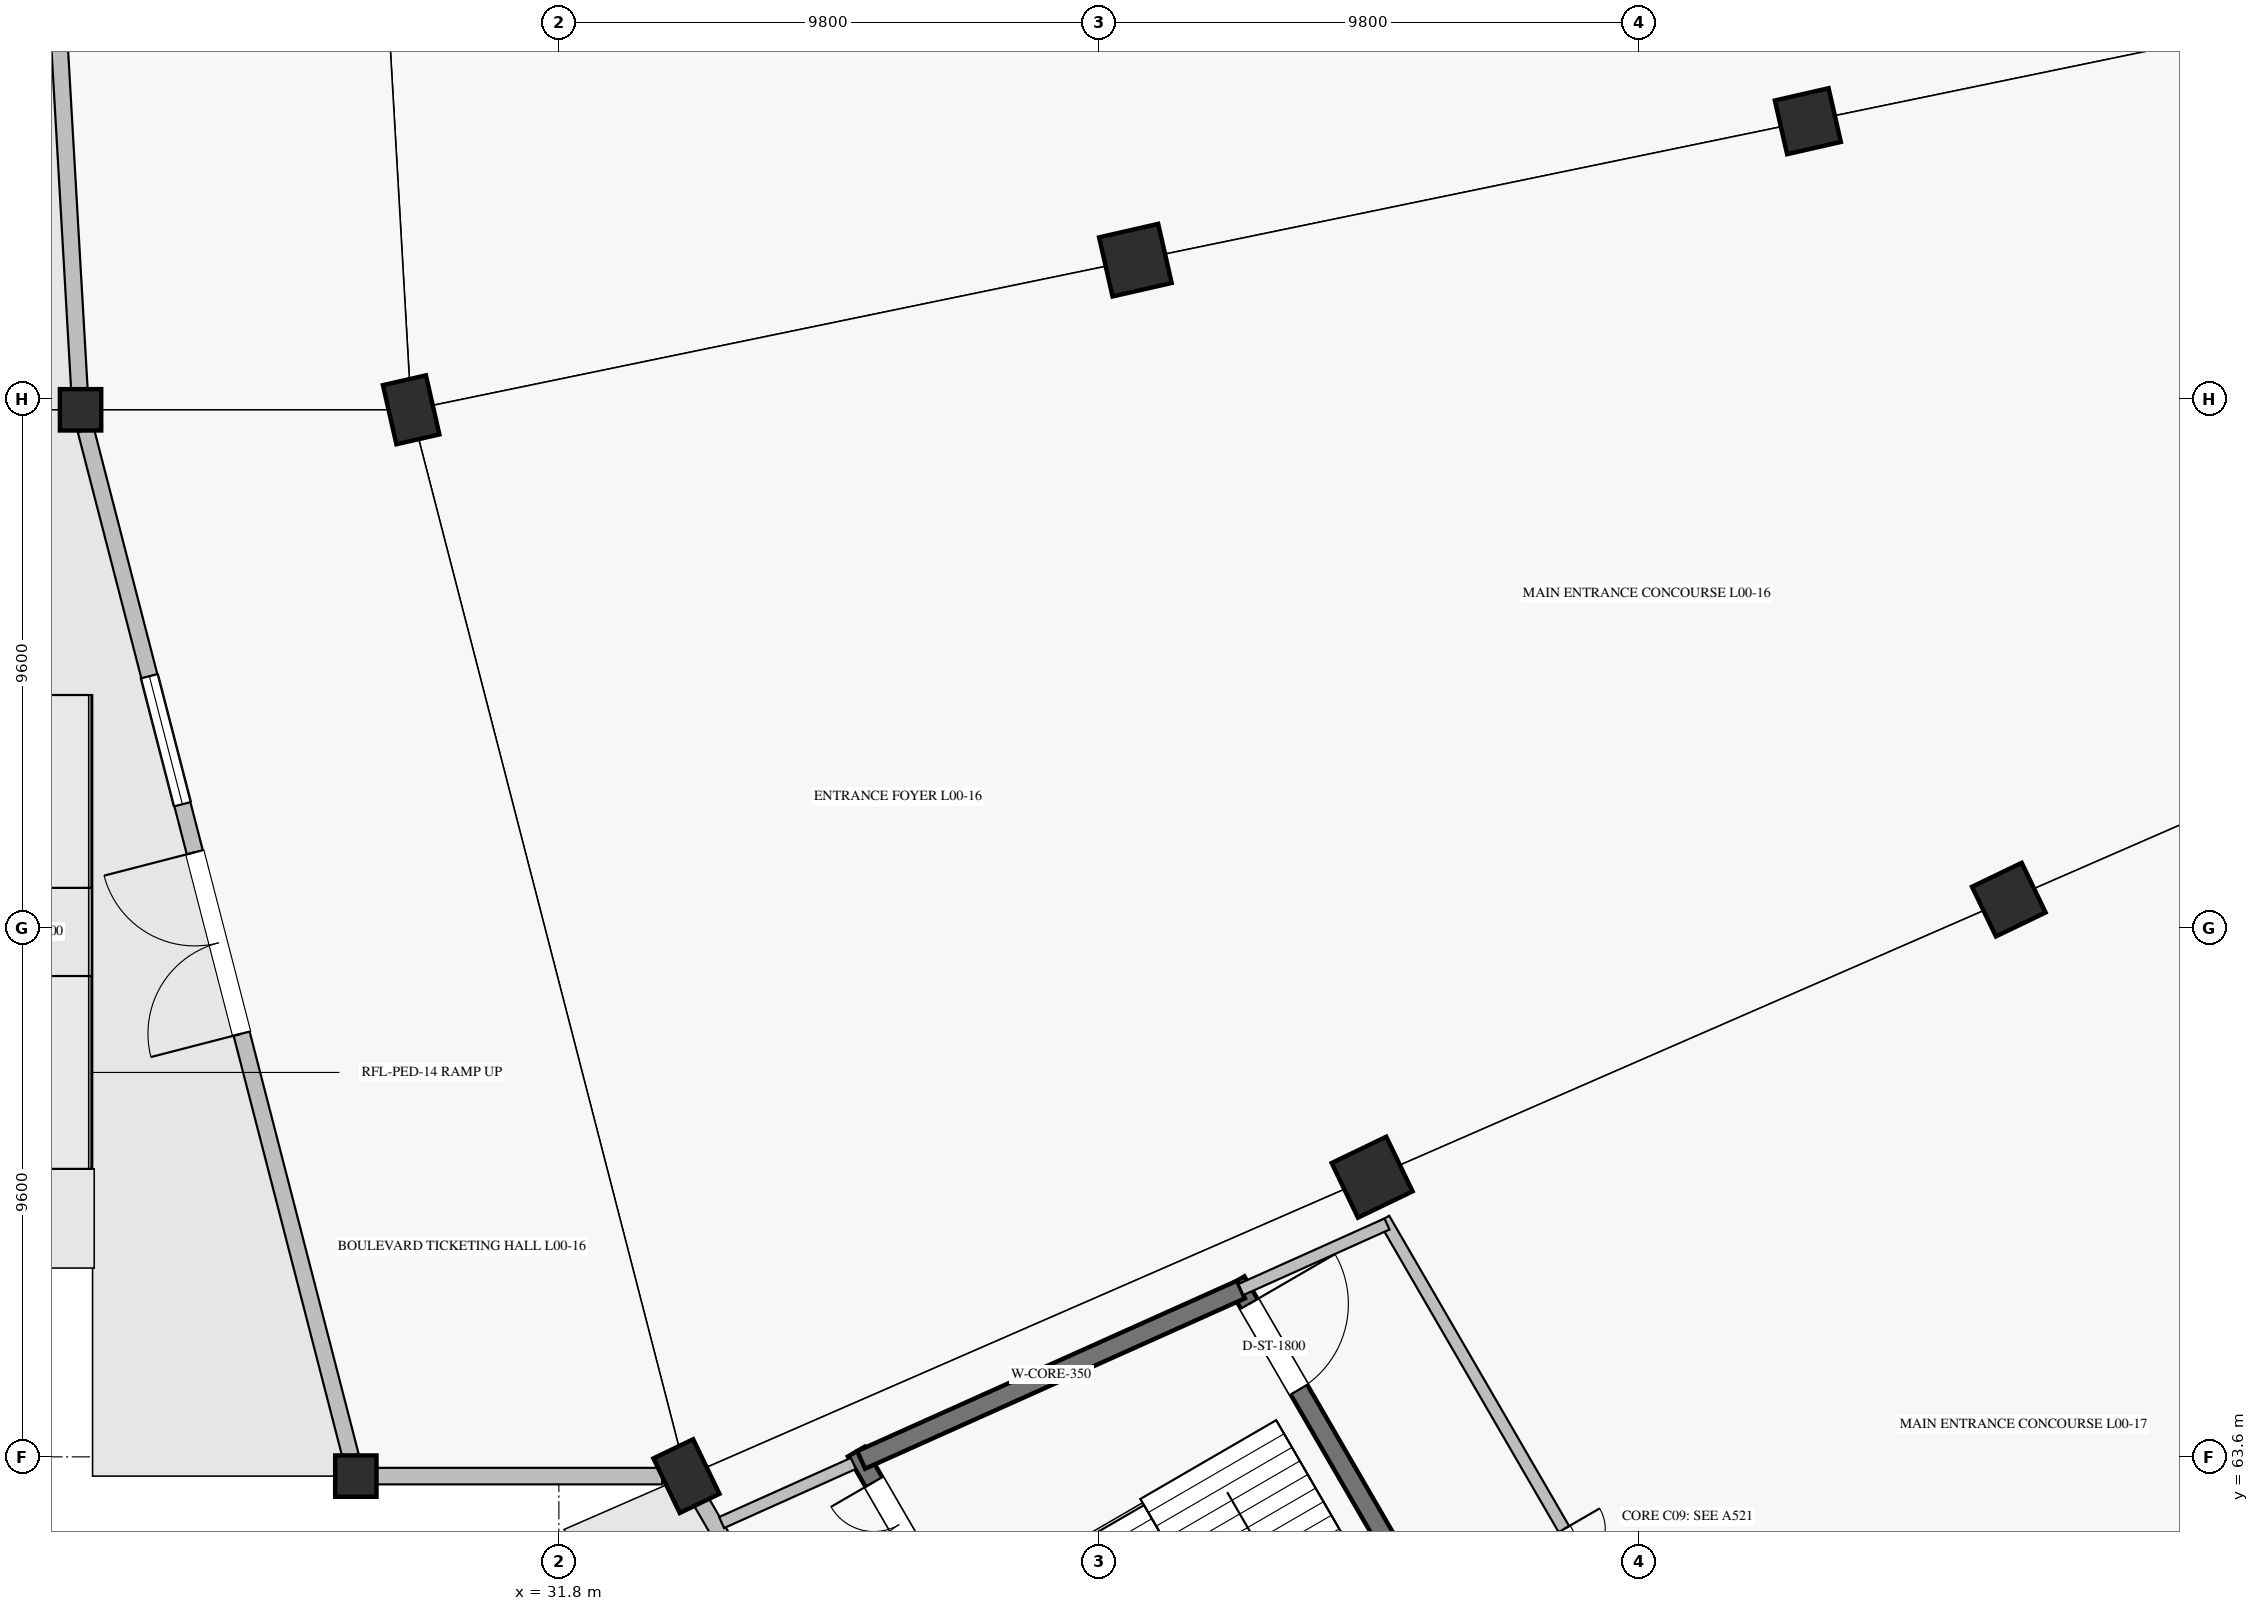
"""IFC4 building model, lengths in metres.
Left out: names, types, materials, properties, quantities, classifications, styles, units other than length and angle.
Written with IfcOpenShell. Run it as: python <this file> out.ifc"""

import sys

from ifc_helpers import new_model, si_unit, direction, frame, frame_2d, origin, origin_2d, place, context, subcontext, project, spatial, rectangle, extrude, element, fill, save


model = new_model("IFC4")
c1 = context("Model", 3, precision=1e-05, world=origin(), true_north=direction((0.0, 1.0)))
c2 = subcontext(c1, "Body", "Model", "MODEL_VIEW")
j1 = project(units=[si_unit("LENGTHUNIT", "METRE"), si_unit("PLANEANGLEUNIT", "RADIAN")], contexts=[c1])
p1 = place(None, origin())
s1 = spatial("IfcSite", under=j1, at=p1, CompositionType="ELEMENT")
p2 = place(p1, origin())
s2 = spatial("IfcBuilding", under=s1, at=p2, CompositionType="ELEMENT")
p3 = place(p2, origin())
s3 = spatial("IfcBuildingStorey", under=s2, at=p3, CompositionType="ELEMENT", Elevation=0.0)
for number, where, z_axis, x_axis in (
    (1, (54.467, 87.84, 0.0), (0.0, 0.0, 1.0), (-0.975, -0.223, 0.0)),
    (2, (58.114, 73.713, 0.0), (0.0, 0.0, 1.0), (-0.901, -0.434, 0.0)),
):
    element("IfcColumn", number, at=place(p3, frame(where, z_axis=z_axis, x_axis=x_axis)), inside=s3, PredefinedType="COLUMN", context=c2, shape_type="SweptSolid", body=[
        extrude(rectangle(XDim=1.0, YDim=1.0, at=origin_2d()), origin(), (0.0, 0.0, 1.0), 5.78),
    ])
for number, where, z_axis, x_axis in (
    (3, (42.262, 85.318, 0.0), (0.0, 0.0, 1.0), (-0.975, -0.223, 0.0)),
    (4, (46.559, 68.675, 0.0), (0.0, 0.0, 1.0), (-0.901, -0.434, 0.0)),
):
    element("IfcColumn", number, at=place(p3, frame(where, z_axis=z_axis, x_axis=x_axis)), inside=s3, PredefinedType="COLUMN", context=c2, shape_type="SweptSolid", body=[
        extrude(rectangle(XDim=1.1, YDim=1.1, at=origin_2d()), origin(), (0.0, 0.0, 1.0), 5.78),
    ])
for number, where, z_axis, x_axis in (
    (5, (29.119, 82.602, 0.0), (0.0, 0.0, 1.0), (-0.975, -0.223, 0.0)),
    (6, (34.115, 63.25, 0.0), (0.0, 0.0, 1.0), (-0.901, -0.434, 0.0)),
):
    element("IfcColumn", number, at=place(p3, frame(where, z_axis=z_axis, x_axis=x_axis)), inside=s3, PredefinedType="COLUMN", context=c2, shape_type="SweptSolid", body=[
        extrude(rectangle(XDim=0.8, YDim=1.1, at=origin_2d()), origin(), (0.0, 0.0, 1.0), 5.78),
    ])
for number, where, z_axis, x_axis in (
    (7, (23.119, 82.602, 0.0), (0.0, 0.0, 1.0), (1.0, 0.0, 0.0)),
    (8, (28.115, 63.25, 0.0), (0.0, 0.0, 1.0), (1.0, 0.0, 0.0)),
):
    element("IfcColumn", number, at=place(p3, frame(where, z_axis=z_axis, x_axis=x_axis)), inside=s3, PredefinedType="COLUMN", context=c2, shape_type="SweptSolid", body=[
        extrude(rectangle(XDim=0.75, YDim=0.75, at=origin_2d()), origin(), (0.0, 0.0, 1.0), 5.78),
    ])
p4 = place(p3, frame((33.675, 63.25, 0.0), z_axis=(0.0, 0.0, 1.0), x_axis=(-1.0, 0.0, 0.0)))
e9 = element("IfcWall", 9, at=p4, inside=s3, PredefinedType="SOLIDWALL", context=c2, shape_type="SweptSolid", body=[
    extrude(rectangle(XDim=5.18, YDim=0.3, at=frame_2d((2.59, 0.0))), origin(), (0.0, 0.0, 1.0), 4.8),
])
p5 = place(p3, frame((22.022, 101.621, 0.0), z_axis=(0.0, 0.0, 1.0), x_axis=(0.057602801108, -0.998339580155, 0.0)))
e10 = element("IfcWall", 10, at=p5, inside=s3, PredefinedType="SOLIDWALL", context=c2, shape_type="SweptSolid", body=[
    extrude(rectangle(XDim=18.67, YDim=0.3, at=frame_2d((9.335, 0.0))), origin(), (0.0, 0.0, 1.0), 4.8),
])
p6 = place(p5, frame((7.635, 0.0, 0.0)))
e11 = element("IfcOpeningElement", 11, at=p6, cuts=e10, PredefinedType="OPENING", context=c2, shape_type="SweptSolid", body=[
    extrude(rectangle(XDim=3.4, YDim=2.6, at=frame_2d((1.7, 1.3))), frame((0.0, 0.16, 0.0), z_axis=(0.0, -1.0, 0.0), x_axis=(1.0, 0.0, 0.0)), (0.0, 0.0, 1.0), 0.32),
])
p7 = place(p5, frame((4.335, 0.0, 1.1)))
e12 = element("IfcOpeningElement", 12, at=p7, cuts=e10, PredefinedType="OPENING", context=c2, shape_type="SweptSolid", body=[
    extrude(rectangle(XDim=2.4, YDim=1.8, at=frame_2d((1.2, 0.9))), frame((0.0, 0.16, 0.0), z_axis=(0.0, -1.0, 0.0), x_axis=(1.0, 0.0, 0.0)), (0.0, 0.0, 1.0), 0.32),
])
p8 = place(p3, frame((23.214, 82.234, 0.0), z_axis=(0.0, 0.0, 1.0), x_axis=(0.249965196191, -0.968254822189, 0.0)))
e13 = element("IfcWall", 13, at=p8, inside=s3, PredefinedType="SOLIDWALL", context=c2, shape_type="SweptSolid", body=[
    extrude(rectangle(XDim=19.226, YDim=0.3, at=frame_2d((9.613, 0.0))), origin(), (0.0, 0.0, 1.0), 4.8),
])
p9 = place(p8, frame((7.913, 0.0, 0.0)))
e14 = element("IfcOpeningElement", 14, at=p9, cuts=e13, PredefinedType="OPENING", context=c2, shape_type="SweptSolid", body=[
    extrude(rectangle(XDim=3.4, YDim=2.6, at=frame_2d((1.7, 1.3))), frame((0.0, 0.16, 0.0), z_axis=(0.0, -1.0, 0.0), x_axis=(1.0, 0.0, 0.0)), (0.0, 0.0, 1.0), 0.32),
])
p10 = place(p8, frame((4.613, 0.0, 1.1)))
e15 = element("IfcOpeningElement", 15, at=p10, cuts=e13, PredefinedType="OPENING", context=c2, shape_type="SweptSolid", body=[
    extrude(rectangle(XDim=2.4, YDim=1.8, at=frame_2d((1.2, 0.9))), frame((0.0, 0.16, 0.0), z_axis=(0.0, -1.0, 0.0), x_axis=(1.0, 0.0, 0.0)), (0.0, 0.0, 1.0), 0.32),
])
p11 = place(p3, frame((34.311, 62.913, 0.0), z_axis=(0.0, 0.0, 1.0), x_axis=(0.501609752715, -0.865094015689, 0.0)))
e16 = element("IfcWall", 16, at=p11, inside=s3, PredefinedType="SOLIDWALL", context=c2, shape_type="SweptSolid", body=[
    extrude(rectangle(XDim=19.932, YDim=0.3, at=frame_2d((9.966, 0.0))), origin(), (0.0, 0.0, 1.0), 4.8),
])
p12 = place(p11, frame((1.05, 0.0, 0.0)))
e17 = element("IfcOpeningElement", 17, at=p12, cuts=e16, PredefinedType="OPENING", context=c2, shape_type="SweptSolid", body=[
    extrude(rectangle(XDim=2.0, YDim=2.3, at=frame_2d((1.0, 1.15))), frame((0.0, 0.16, 0.0), z_axis=(0.0, -1.0, 0.0), x_axis=(1.0, 0.0, 0.0)), (0.0, 0.0, 1.0), 0.32),
])
p13 = place(p3, frame((44.09, 66.788, 0.0), z_axis=(0.0, 0.0, 1.0), x_axis=(0.501628624814, -0.865083072755, 0.0)))
e18 = element("IfcWall", 18, at=p13, inside=s3, PredefinedType="SHEAR", context=c2, shape_type="SweptSolid", body=[
    extrude(rectangle(XDim=11.435, YDim=0.35, at=frame_2d((5.718, 0.0))), origin(), (0.0, 0.0, 1.0), 5.5),
])
p14 = place(p13, frame((0.475, 0.0, 0.0)))
e19 = element("IfcOpeningElement", 19, at=p14, cuts=e18, PredefinedType="OPENING", context=c2, shape_type="SweptSolid", body=[
    extrude(rectangle(XDim=1.8, YDim=2.2, at=frame_2d((0.9, 1.1))), frame((0.0, 0.185, 0.0), z_axis=(0.0, -1.0, 0.0), x_axis=(1.0, 0.0, 0.0)), (0.0, 0.0, 1.0), 0.37),
])
p15 = place(p3, frame((37.198, 63.695, 0.0), z_axis=(0.0, 0.0, 1.0), x_axis=(0.501601740165, -0.865098661577, 0.0)))
e20 = element("IfcWall", 20, at=p15, inside=s3, PredefinedType="SHEAR", context=c2, shape_type="SweptSolid", body=[
    extrude(rectangle(XDim=12.405, YDim=0.35, at=frame_2d((6.202, 0.0))), origin(), (0.0, 0.0, 1.0), 5.5),
])
p16 = place(p15, frame((0.637, 0.0, 0.0)))
e21 = element("IfcOpeningElement", 21, at=p16, cuts=e20, PredefinedType="OPENING", context=c2, shape_type="SweptSolid", body=[
    extrude(rectangle(XDim=1.8, YDim=2.2, at=frame_2d((0.9, 1.1))), frame((0.0, 0.185, 0.0), z_axis=(0.0, -1.0, 0.0), x_axis=(1.0, 0.0, 0.0)), (0.0, 0.0, 1.0), 0.37),
])
p17 = place(p3, frame((37.144, 63.48, 0.0), z_axis=(0.0, 0.0, 1.0), x_axis=(-0.912368969251, -0.409368860501, 0.0)))
e22 = element("IfcWall", 22, at=p17, inside=s3, PredefinedType="SOLIDWALL", context=c2, shape_type="SweptSolid", body=[
    extrude(rectangle(XDim=2.621, YDim=0.22, at=frame_2d((1.31, 0.0))), origin(), (0.0, 0.0, 1.0), 5.5),
])
p18 = place(p3, frame((44.178, 66.636, 0.0), z_axis=(0.0, 0.0, 1.0), x_axis=(-0.912385324524, -0.409332407212, 0.0)))
e23 = element("IfcWall", 23, at=p18, inside=s3, PredefinedType="SHEAR", context=c2, shape_type="SweptSolid", body=[
    extrude(rectangle(XDim=7.554, YDim=0.35, at=frame_2d((3.777, 0.0))), origin(), (0.0, 0.0, 1.0), 5.5),
])
p19 = place(p3, frame((46.774, 67.921, 0.0), z_axis=(0.0, 0.0, 1.0), x_axis=(0.501612626242, -0.865092349518, 0.0)))
e24 = element("IfcWall", 24, at=p19, inside=s3, PredefinedType="SOLIDWALL", context=c2, shape_type="SweptSolid", body=[
    extrude(rectangle(XDim=16.11, YDim=0.22, at=frame_2d((8.055, 0.0))), origin(), (0.0, 0.0, 1.0), 4.448),
])
p20 = place(p19, frame((6.511, 0.0, 0.0)))
e25 = element("IfcOpeningElement", 25, at=p20, cuts=e24, PredefinedType="OPENING", context=c2, shape_type="SweptSolid", body=[
    extrude(rectangle(XDim=1.5, YDim=2.2, at=frame_2d((0.75, 1.1))), frame((0.0, 0.12, 0.0), z_axis=(0.0, -1.0, 0.0), x_axis=(1.0, 0.0, 0.0)), (0.0, 0.0, 1.0), 0.24),
])
p21 = place(p3, frame((46.829, 67.826, 0.0), z_axis=(0.0, 0.0, 1.0), x_axis=(-0.912378422162, -0.409347791949, 0.0)))
e26 = element("IfcWall", 26, at=p21, inside=s3, PredefinedType="SOLIDWALL", context=c2, shape_type="SweptSolid", body=[
    extrude(rectangle(XDim=2.906, YDim=0.22, at=frame_2d((1.453, 0.0))), origin(), (0.0, 0.0, 1.0), 5.5),
])
p22 = place(p9, frame((3.4, 0.0, 0.0), z_axis=(0.0, 0.0, 1.0), x_axis=(-1.0, 0.0, 0.0)))
e27 = element("IfcDoor", 27, at=p22, inside=s3, OperationType="DOUBLE_DOOR_SINGLE_SWING", PredefinedType="DOOR", context=c2, shape_type="SweptSolid", body=[
    extrude(rectangle(XDim=3.4, YDim=2.6, at=frame_2d((1.7, 1.3))), frame((0.0, 0.025, 0.0), z_axis=(0.0, -1.0, 0.0), x_axis=(1.0, 0.0, 0.0)), (0.0, 0.0, 1.0), 0.05),
])
fill(e14, e27)
p23 = place(p10, origin())
e28 = element("IfcWindow", 28, at=p23, inside=s3, PartitioningType="SINGLE_PANEL", PredefinedType="WINDOW", context=c2, shape_type="SweptSolid", body=[
    extrude(rectangle(XDim=2.4, YDim=1.8, at=frame_2d((1.2, 0.9))), frame((0.0, 0.03, 0.0), z_axis=(0.0, -1.0, 0.0), x_axis=(1.0, 0.0, 0.0)), (0.0, 0.0, 1.0), 0.06),
])
fill(e15, e28)
p24 = place(p16, frame((1.8, 0.0, 0.0), z_axis=(0.0, 0.0, 1.0), x_axis=(-1.0, 0.0, 0.0)))
e29 = element("IfcDoor", 29, at=p24, inside=s3, OperationType="DOUBLE_DOOR_SINGLE_SWING", PredefinedType="DOOR", context=c2, shape_type="SweptSolid", body=[
    extrude(rectangle(XDim=1.8, YDim=2.2, at=frame_2d((0.9, 1.1))), frame((0.0, 0.025, 0.0), z_axis=(0.0, -1.0, 0.0), x_axis=(1.0, 0.0, 0.0)), (0.0, 0.0, 1.0), 0.05),
])
fill(e21, e29)
p25 = place(p14, origin())
e30 = element("IfcDoor", 30, at=p25, inside=s3, OperationType="SINGLE_SWING_LEFT", PredefinedType="DOOR", context=c2, shape_type="SweptSolid", body=[
    extrude(rectangle(XDim=1.8, YDim=2.2, at=frame_2d((0.9, 1.1))), frame((0.0, 0.025, 0.0), z_axis=(0.0, -1.0, 0.0), x_axis=(1.0, 0.0, 0.0)), (0.0, 0.0, 1.0), 0.05),
])
fill(e19, e30)
p26 = place(p20, origin())
e31 = element("IfcDoor", 31, at=p26, inside=s3, OperationType="DOUBLE_DOOR_SINGLE_SWING", PredefinedType="DOOR", context=c2, shape_type="SweptSolid", body=[
    extrude(rectangle(XDim=1.5, YDim=2.2, at=frame_2d((0.75, 1.1))), frame((0.0, 0.025, 0.0), z_axis=(0.0, -1.0, 0.0), x_axis=(1.0, 0.0, 0.0)), (0.0, 0.0, 1.0), 0.05),
])
fill(e25, e31)
save(model, sys.argv[1])
